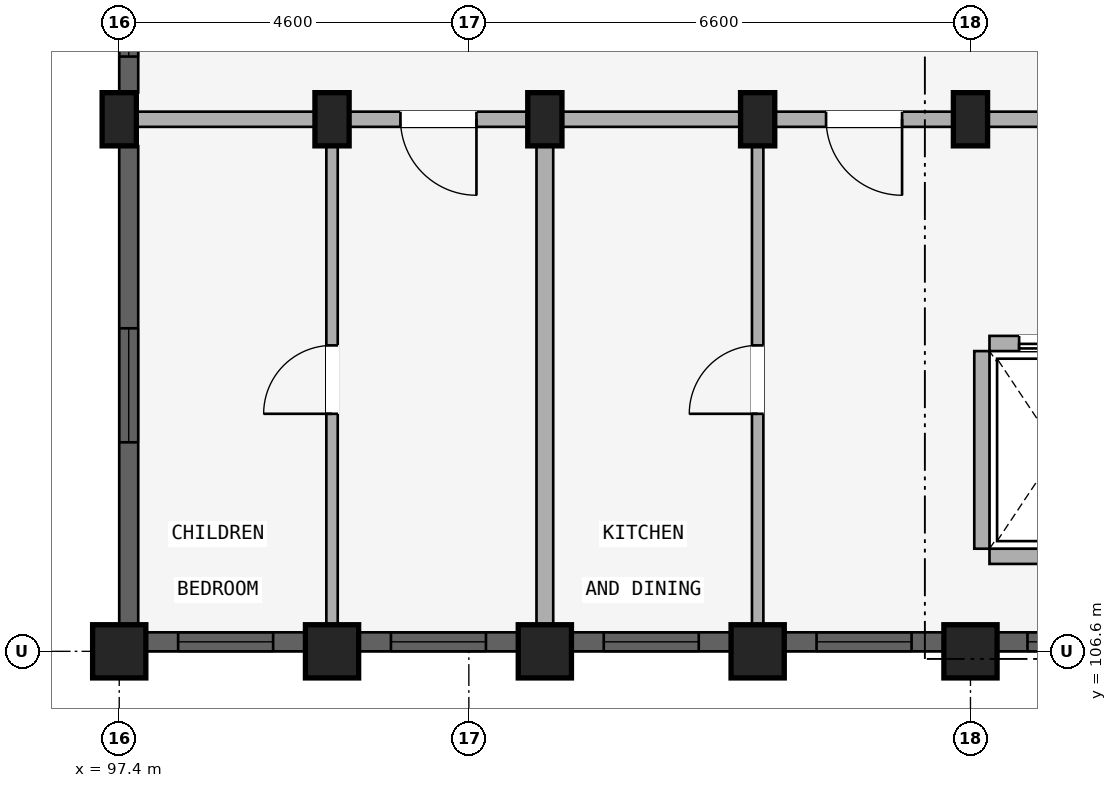
"""IFC4 building model, lengths in metres.
Left out: names, types, materials, properties, quantities, classifications, styles, units other than length and angle.
Written with IfcOpenShell. Run it as: python <this file> out.ifc"""

import sys

from ifc_helpers import new_model, si_unit, direction, frame, frame_2d, origin, origin_2d, place, context, subcontext, project, spatial, rectangle, extrude, element, fill, save


model = new_model("IFC4")
c1 = context("Model", 3, precision=1e-05, world=origin(), true_north=direction((0.0, 1.0)))
c2 = subcontext(c1, "Body", "Model", "MODEL_VIEW")
j1 = project(units=[si_unit("LENGTHUNIT", "METRE"), si_unit("PLANEANGLEUNIT", "RADIAN")], contexts=[c1])
p1 = place(None, origin())
s1 = spatial("IfcSite", under=j1, at=p1, CompositionType="ELEMENT")
p2 = place(p1, origin())
s2 = spatial("IfcBuilding", under=s1, at=p2, CompositionType="ELEMENT")
p3 = place(p2, frame((0.0, 0.0, 24.45)))
s3 = spatial("IfcBuildingStorey", under=s2, at=p3, CompositionType="ELEMENT", Elevation=24.45)
p4 = place(p3, frame((108.6, 106.6, 0.0), z_axis=(0.0, 0.0, 1.0), x_axis=(1.0, 0.0, 0.0)))
e1 = element("IfcColumn", 1, at=p4, inside=s3, PredefinedType="COLUMN", context=c2, shape_type="SweptSolid", body=[
    extrude(rectangle(XDim=0.7, YDim=0.7, at=origin_2d()), origin(), (0.0, 0.0, 1.0), 2.93),
])
p5 = place(p3, frame((108.6, 113.6, 0.0), z_axis=(0.0, 0.0, 1.0), x_axis=(1.0, 0.0, 0.0)))
e2 = element("IfcColumn", 2, at=p5, inside=s3, PredefinedType="COLUMN", context=c2, shape_type="SweptSolid", body=[
    extrude(rectangle(XDim=0.45, YDim=0.7, at=origin_2d()), origin(), (0.0, 0.0, 1.0), 2.93),
])
p6 = place(p3, frame((105.8, 106.6, 0.0), z_axis=(0.0, 0.0, 1.0), x_axis=(1.0, 0.0, 0.0)))
e3 = element("IfcColumn", 3, at=p6, inside=s3, PredefinedType="COLUMN", context=c2, shape_type="SweptSolid", body=[
    extrude(rectangle(XDim=0.7, YDim=0.7, at=origin_2d()), origin(), (0.0, 0.0, 1.0), 2.93),
])
p7 = place(p3, frame((105.8, 113.6, 0.0), z_axis=(0.0, 0.0, 1.0), x_axis=(1.0, 0.0, 0.0)))
e4 = element("IfcColumn", 4, at=p7, inside=s3, PredefinedType="COLUMN", context=c2, shape_type="SweptSolid", body=[
    extrude(rectangle(XDim=0.45, YDim=0.7, at=origin_2d()), origin(), (0.0, 0.0, 1.0), 2.93),
])
p8 = place(p3, frame((103.0, 106.6, 0.0), z_axis=(0.0, 0.0, 1.0), x_axis=(1.0, 0.0, 0.0)))
e5 = element("IfcColumn", 5, at=p8, inside=s3, PredefinedType="COLUMN", context=c2, shape_type="SweptSolid", body=[
    extrude(rectangle(XDim=0.7, YDim=0.7, at=origin_2d()), origin(), (0.0, 0.0, 1.0), 2.93),
])
p9 = place(p3, frame((103.0, 113.6, 0.0), z_axis=(0.0, 0.0, 1.0), x_axis=(1.0, 0.0, 0.0)))
e6 = element("IfcColumn", 6, at=p9, inside=s3, PredefinedType="COLUMN", context=c2, shape_type="SweptSolid", body=[
    extrude(rectangle(XDim=0.45, YDim=0.7, at=origin_2d()), origin(), (0.0, 0.0, 1.0), 2.93),
])
p10 = place(p3, frame((100.2, 106.6, 0.0), z_axis=(0.0, 0.0, 1.0), x_axis=(1.0, 0.0, 0.0)))
e7 = element("IfcColumn", 7, at=p10, inside=s3, PredefinedType="COLUMN", context=c2, shape_type="SweptSolid", body=[
    extrude(rectangle(XDim=0.7, YDim=0.7, at=origin_2d()), origin(), (0.0, 0.0, 1.0), 2.93),
])
p11 = place(p3, frame((100.2, 113.6, 0.0), z_axis=(0.0, 0.0, 1.0), x_axis=(1.0, 0.0, 0.0)))
e8 = element("IfcColumn", 8, at=p11, inside=s3, PredefinedType="COLUMN", context=c2, shape_type="SweptSolid", body=[
    extrude(rectangle(XDim=0.45, YDim=0.7, at=origin_2d()), origin(), (0.0, 0.0, 1.0), 2.93),
])
p12 = place(p3, frame((97.4, 106.6, 0.0), z_axis=(0.0, 0.0, 1.0), x_axis=(1.0, 0.0, 0.0)))
e9 = element("IfcColumn", 9, at=p12, inside=s3, PredefinedType="COLUMN", context=c2, shape_type="SweptSolid", body=[
    extrude(rectangle(XDim=0.7, YDim=0.7, at=origin_2d()), origin(), (0.0, 0.0, 1.0), 2.93),
])
p13 = place(p3, frame((97.4, 113.6, 0.0), z_axis=(0.0, 0.0, 1.0), x_axis=(1.0, 0.0, 0.0)))
e10 = element("IfcColumn", 10, at=p13, inside=s3, PredefinedType="COLUMN", context=c2, shape_type="SweptSolid", body=[
    extrude(rectangle(XDim=0.45, YDim=0.7, at=origin_2d()), origin(), (0.0, 0.0, 1.0), 2.93),
])
p14 = place(p3, frame((108.75, 107.95, 0.0), z_axis=(0.0, 0.0, 1.0), x_axis=(0.0, 1.0, 0.0)))
e11 = element("IfcWall", 11, at=p14, inside=s3, PredefinedType="STANDARD", context=c2, shape_type="SweptSolid", body=[
    extrude(rectangle(XDim=2.6, YDim=0.2, at=frame_2d((1.3, 0.0))), origin(), (0.0, 0.0, 1.0), 2.372),
])
p15 = place(p3, frame((110.65, 107.85, 0.0), z_axis=(0.0, 0.0, 1.0), x_axis=(-1.0, 0.0, 0.0)))
e12 = element("IfcWall", 12, at=p15, inside=s3, PredefinedType="STANDARD", context=c2, shape_type="SweptSolid", body=[
    extrude(rectangle(XDim=1.8, YDim=0.2, at=frame_2d((0.9, 0.0))), origin(), (0.0, 0.0, 1.0), 2.93),
])
p16 = place(p3, frame((110.65, 110.65, 0.0), z_axis=(0.0, 0.0, 1.0), x_axis=(-1.0, 0.0, 0.0)))
e13 = element("IfcWall", 13, at=p16, inside=s3, PredefinedType="STANDARD", context=c2, shape_type="SweptSolid", body=[
    extrude(rectangle(XDim=1.8, YDim=0.2, at=frame_2d((0.9, 0.0))), origin(), (0.0, 0.0, 1.0), 2.93),
])
p17 = place(p16, frame((0.39, 0.0, 0.0)))
e14 = element("IfcOpeningElement", 14, at=p17, cuts=e13, PredefinedType="OPENING", context=c2, shape_type="SweptSolid", body=[
    extrude(rectangle(XDim=1.02, YDim=2.15, at=frame_2d((0.51, 1.075))), frame((0.0, 0.11, 0.0), z_axis=(0.0, -1.0, 0.0), x_axis=(1.0, 0.0, 0.0)), (0.0, 0.0, 1.0), 0.22),
])
p18 = place(p3, frame((114.25, 113.6, 0.0), z_axis=(0.0, 0.0, 1.0), x_axis=(-1.0, 0.0, 0.0)))
e15 = element("IfcWall", 15, at=p18, inside=s3, PredefinedType="STANDARD", context=c2, shape_type="SweptSolid", body=[
    extrude(rectangle(XDim=5.6, YDim=0.2, at=frame_2d((2.8, 0.0))), origin(), (0.0, 0.0, 1.0), 2.372),
])
p19 = place(p18, frame((1.91, 0.0, 0.0)))
e16 = element("IfcOpeningElement", 16, at=p19, cuts=e15, PredefinedType="OPENING", context=c2, shape_type="SweptSolid", body=[
    extrude(rectangle(XDim=1.22, YDim=2.15, at=frame_2d((0.61, 1.075))), frame((0.0, 0.11, 0.0), z_axis=(0.0, -1.0, 0.0), x_axis=(1.0, 0.0, 0.0)), (0.0, 0.0, 1.0), 0.22),
])
p20 = place(p3, frame((108.6, 113.6, 0.0), z_axis=(0.0, 0.0, 1.0), x_axis=(-1.0, 0.0, 0.0)))
e17 = element("IfcWall", 17, at=p20, inside=s3, PredefinedType="STANDARD", context=c2, shape_type="SweptSolid", body=[
    extrude(rectangle(XDim=2.8, YDim=0.2, at=frame_2d((1.4, 0.0))), origin(), (0.0, 0.0, 1.0), 2.372),
])
p21 = place(p20, frame((0.9, 0.0, 0.0)))
e18 = element("IfcOpeningElement", 18, at=p21, cuts=e17, PredefinedType="OPENING", context=c2, shape_type="SweptSolid", body=[
    extrude(rectangle(XDim=1.0, YDim=2.15, at=frame_2d((0.5, 1.075))), frame((0.0, 0.11, 0.0), z_axis=(0.0, -1.0, 0.0), x_axis=(1.0, 0.0, 0.0)), (0.0, 0.0, 1.0), 0.22),
])
p22 = place(p3, frame((105.8, 113.6, 0.0), z_axis=(0.0, 0.0, 1.0), x_axis=(-1.0, 0.0, 0.0)))
e19 = element("IfcWall", 19, at=p22, inside=s3, PredefinedType="STANDARD", context=c2, shape_type="SweptSolid", body=[
    extrude(rectangle(XDim=2.8, YDim=0.2, at=frame_2d((1.4, 0.0))), origin(), (0.0, 0.0, 1.0), 2.372),
])
p23 = place(p3, frame((103.0, 113.6, 0.0), z_axis=(0.0, 0.0, 1.0), x_axis=(-1.0, 0.0, 0.0)))
e20 = element("IfcWall", 20, at=p23, inside=s3, PredefinedType="STANDARD", context=c2, shape_type="SweptSolid", body=[
    extrude(rectangle(XDim=2.8, YDim=0.2, at=frame_2d((1.4, 0.0))), origin(), (0.0, 0.0, 1.0), 2.372),
])
p24 = place(p23, frame((0.9, 0.0, 0.0)))
e21 = element("IfcOpeningElement", 21, at=p24, cuts=e20, PredefinedType="OPENING", context=c2, shape_type="SweptSolid", body=[
    extrude(rectangle(XDim=1.0, YDim=2.15, at=frame_2d((0.5, 1.075))), frame((0.0, 0.11, 0.0), z_axis=(0.0, -1.0, 0.0), x_axis=(1.0, 0.0, 0.0)), (0.0, 0.0, 1.0), 0.22),
])
p25 = place(p3, frame((100.2, 113.6, 0.0), z_axis=(0.0, 0.0, 1.0), x_axis=(-1.0, 0.0, 0.0)))
e22 = element("IfcWall", 22, at=p25, inside=s3, PredefinedType="STANDARD", context=c2, shape_type="SweptSolid", body=[
    extrude(rectangle(XDim=2.8, YDim=0.2, at=frame_2d((1.4, 0.0))), origin(), (0.0, 0.0, 1.0), 2.372),
])
p26 = place(p3, frame((105.8, 106.8, 0.0), z_axis=(0.0, 0.0, 1.0), x_axis=(0.0, 1.0, 0.0)))
e23 = element("IfcWall", 23, at=p26, inside=s3, PredefinedType="PARTITIONING", context=c2, shape_type="SweptSolid", body=[
    extrude(rectangle(XDim=6.75, YDim=0.15, at=frame_2d((3.375, 0.0))), origin(), (0.0, 0.0, 1.0), 2.372),
])
p27 = place(p26, frame((2.925, 0.0, 0.0)))
e24 = element("IfcOpeningElement", 24, at=p27, cuts=e23, PredefinedType="OPENING", context=c2, shape_type="SweptSolid", body=[
    extrude(rectangle(XDim=0.9, YDim=2.1, at=frame_2d((0.45, 1.05))), frame((0.0, 0.085, 0.0), z_axis=(0.0, -1.0, 0.0), x_axis=(1.0, 0.0, 0.0)), (0.0, 0.0, 1.0), 0.17),
])
p28 = place(p3, frame((103.0, 106.8, 0.0), z_axis=(0.0, 0.0, 1.0), x_axis=(0.0, 1.0, 0.0)))
e25 = element("IfcWall", 25, at=p28, inside=s3, PredefinedType="STANDARD", context=c2, shape_type="SweptSolid", body=[
    extrude(rectangle(XDim=6.75, YDim=0.22, at=frame_2d((3.375, 0.0))), origin(), (0.0, 0.0, 1.0), 2.372),
])
p29 = place(p3, frame((100.2, 106.8, 0.0), z_axis=(0.0, 0.0, 1.0), x_axis=(0.0, 1.0, 0.0)))
e26 = element("IfcWall", 26, at=p29, inside=s3, PredefinedType="PARTITIONING", context=c2, shape_type="SweptSolid", body=[
    extrude(rectangle(XDim=6.75, YDim=0.15, at=frame_2d((3.375, 0.0))), origin(), (0.0, 0.0, 1.0), 2.372),
])
p30 = place(p29, frame((2.925, 0.0, 0.0)))
e27 = element("IfcOpeningElement", 27, at=p30, cuts=e26, PredefinedType="OPENING", context=c2, shape_type="SweptSolid", body=[
    extrude(rectangle(XDim=0.9, YDim=2.1, at=frame_2d((0.45, 1.05))), frame((0.0, 0.085, 0.0), z_axis=(0.0, -1.0, 0.0), x_axis=(1.0, 0.0, 0.0)), (0.0, 0.0, 1.0), 0.17),
])
p31 = place(p3, frame((111.372, 106.725, 0.0), z_axis=(0.0, 0.0, 1.0), x_axis=(-1.0, 0.0, 0.0)))
e28 = element("IfcWall", 28, at=p31, inside=s3, PredefinedType="STANDARD", context=c2, shape_type="SweptSolid", body=[
    extrude(rectangle(XDim=2.422, YDim=0.25, at=frame_2d((1.211, 0.0))), origin(), (0.0, 0.0, 1.0), 2.472),
])
p32 = place(p31, frame((0.822, 0.0, 0.772)))
e29 = element("IfcOpeningElement", 29, at=p32, cuts=e28, PredefinedType="OPENING", context=c2, shape_type="SweptSolid", body=[
    extrude(rectangle(XDim=1.2, YDim=1.5, at=frame_2d((0.6, 0.75))), frame((0.0, 0.135, 0.0), z_axis=(0.0, -1.0, 0.0), x_axis=(1.0, 0.0, 0.0)), (0.0, 0.0, 1.0), 0.27),
])
p33 = place(p3, frame((108.247, 106.725, 0.0), z_axis=(0.0, 0.0, 1.0), x_axis=(-1.0, 0.0, 0.0)))
e30 = element("IfcWall", 30, at=p33, inside=s3, PredefinedType="STANDARD", context=c2, shape_type="SweptSolid", body=[
    extrude(rectangle(XDim=2.093, YDim=0.25, at=frame_2d((1.046, 0.0))), origin(), (0.0, 0.0, 1.0), 2.472),
])
p34 = place(p33, frame((0.421, 0.0, 0.722)))
e31 = element("IfcOpeningElement", 31, at=p34, cuts=e30, PredefinedType="OPENING", context=c2, shape_type="SweptSolid", body=[
    extrude(rectangle(XDim=1.25, YDim=1.55, at=frame_2d((0.625, 0.775))), frame((0.0, 0.135, 0.0), z_axis=(0.0, -1.0, 0.0), x_axis=(1.0, 0.0, 0.0)), (0.0, 0.0, 1.0), 0.27),
])
p35 = place(p3, frame((105.447, 106.725, 0.0), z_axis=(0.0, 0.0, 1.0), x_axis=(-1.0, 0.0, 0.0)))
e32 = element("IfcWall", 32, at=p35, inside=s3, PredefinedType="STANDARD", context=c2, shape_type="SweptSolid", body=[
    extrude(rectangle(XDim=2.093, YDim=0.25, at=frame_2d((1.046, 0.0))), origin(), (0.0, 0.0, 1.0), 2.472),
])
p36 = place(p35, frame((0.421, 0.0, 0.722)))
e33 = element("IfcOpeningElement", 33, at=p36, cuts=e32, PredefinedType="OPENING", context=c2, shape_type="SweptSolid", body=[
    extrude(rectangle(XDim=1.25, YDim=1.55, at=frame_2d((0.625, 0.775))), frame((0.0, 0.135, 0.0), z_axis=(0.0, -1.0, 0.0), x_axis=(1.0, 0.0, 0.0)), (0.0, 0.0, 1.0), 0.27),
])
p37 = place(p3, frame((102.646, 106.725, 0.0), z_axis=(0.0, 0.0, 1.0), x_axis=(-1.0, 0.0, 0.0)))
e34 = element("IfcWall", 34, at=p37, inside=s3, PredefinedType="STANDARD", context=c2, shape_type="SweptSolid", body=[
    extrude(rectangle(XDim=2.093, YDim=0.25, at=frame_2d((1.046, 0.0))), origin(), (0.0, 0.0, 1.0), 2.472),
])
p38 = place(p37, frame((0.421, 0.0, 0.722)))
e35 = element("IfcOpeningElement", 35, at=p38, cuts=e34, PredefinedType="OPENING", context=c2, shape_type="SweptSolid", body=[
    extrude(rectangle(XDim=1.25, YDim=1.55, at=frame_2d((0.625, 0.775))), frame((0.0, 0.135, 0.0), z_axis=(0.0, -1.0, 0.0), x_axis=(1.0, 0.0, 0.0)), (0.0, 0.0, 1.0), 0.27),
])
p39 = place(p3, frame((99.846, 106.725, 0.0), z_axis=(0.0, 0.0, 1.0), x_axis=(-1.0, 0.0, 0.0)))
e36 = element("IfcWall", 36, at=p39, inside=s3, PredefinedType="STANDARD", context=c2, shape_type="SweptSolid", body=[
    extrude(rectangle(XDim=2.093, YDim=0.25, at=frame_2d((1.046, 0.0))), origin(), (0.0, 0.0, 1.0), 2.472),
])
p40 = place(p39, frame((0.421, 0.0, 0.722)))
e37 = element("IfcOpeningElement", 37, at=p40, cuts=e36, PredefinedType="OPENING", context=c2, shape_type="SweptSolid", body=[
    extrude(rectangle(XDim=1.25, YDim=1.55, at=frame_2d((0.625, 0.775))), frame((0.0, 0.135, 0.0), z_axis=(0.0, -1.0, 0.0), x_axis=(1.0, 0.0, 0.0)), (0.0, 0.0, 1.0), 0.27),
])
p41 = place(p3, frame((97.525, 106.954, 0.0), z_axis=(0.0, 0.0, 1.0), x_axis=(0.0, 1.0, 0.0)))
e38 = element("IfcWall", 38, at=p41, inside=s3, PredefinedType="STANDARD", context=c2, shape_type="SweptSolid", body=[
    extrude(rectangle(XDim=6.293, YDim=0.25, at=frame_2d((3.146, 0.0))), origin(), (0.0, 0.0, 1.0), 2.372),
])
p42 = place(p41, frame((2.396, 0.0, 0.522)))
e39 = element("IfcOpeningElement", 39, at=p42, cuts=e38, PredefinedType="OPENING", context=c2, shape_type="SweptSolid", body=[
    extrude(rectangle(XDim=1.5, YDim=1.65, at=frame_2d((0.75, 0.825))), frame((0.0, 0.135, 0.0), z_axis=(0.0, -1.0, 0.0), x_axis=(1.0, 0.0, 0.0)), (0.0, 0.0, 1.0), 0.27),
])
p43 = place(p3, frame((97.525, 113.954, 0.0), z_axis=(0.0, 0.0, 1.0), x_axis=(0.0, 1.0, 0.0)))
e40 = element("IfcWall", 40, at=p43, inside=s3, PredefinedType="STANDARD", context=c2, shape_type="SweptSolid", body=[
    extrude(rectangle(XDim=1.693, YDim=0.25, at=frame_2d((0.846, 0.0))), origin(), (0.0, 0.0, 1.0), 2.372),
])
p44 = place(p43, frame((0.471, 0.0, 0.88)))
e41 = element("IfcOpeningElement", 41, at=p44, cuts=e40, PredefinedType="OPENING", context=c2, shape_type="SweptSolid", body=[
    extrude(rectangle(XDim=0.75, YDim=1.05, at=frame_2d((0.375, 0.525))), frame((0.0, 0.135, 0.0), z_axis=(0.0, -1.0, 0.0), x_axis=(1.0, 0.0, 0.0)), (0.0, 0.0, 1.0), 0.27),
])
p45 = place(p32, origin())
e42 = element("IfcWindow", 42, at=p45, inside=s3, PartitioningType="SINGLE_PANEL", PredefinedType="WINDOW", context=c2, shape_type="SweptSolid", body=[
    extrude(rectangle(XDim=1.2, YDim=1.5, at=frame_2d((0.6, 0.75))), frame((0.0, 0.03, 0.0), z_axis=(0.0, -1.0, 0.0), x_axis=(1.0, 0.0, 0.0)), (0.0, 0.0, 1.0), 0.06),
])
fill(e29, e42)
p46 = place(p34, origin())
e43 = element("IfcWindow", 43, at=p46, inside=s3, PartitioningType="SINGLE_PANEL", PredefinedType="WINDOW", context=c2, shape_type="SweptSolid", body=[
    extrude(rectangle(XDim=1.25, YDim=1.55, at=frame_2d((0.625, 0.775))), frame((0.0, 0.03, 0.0), z_axis=(0.0, -1.0, 0.0), x_axis=(1.0, 0.0, 0.0)), (0.0, 0.0, 1.0), 0.06),
])
fill(e31, e43)
p47 = place(p36, origin())
e44 = element("IfcWindow", 44, at=p47, inside=s3, PartitioningType="SINGLE_PANEL", PredefinedType="WINDOW", context=c2, shape_type="SweptSolid", body=[
    extrude(rectangle(XDim=1.25, YDim=1.55, at=frame_2d((0.625, 0.775))), frame((0.0, 0.03, 0.0), z_axis=(0.0, -1.0, 0.0), x_axis=(1.0, 0.0, 0.0)), (0.0, 0.0, 1.0), 0.06),
])
fill(e33, e44)
p48 = place(p38, origin())
e45 = element("IfcWindow", 45, at=p48, inside=s3, PartitioningType="SINGLE_PANEL", PredefinedType="WINDOW", context=c2, shape_type="SweptSolid", body=[
    extrude(rectangle(XDim=1.25, YDim=1.55, at=frame_2d((0.625, 0.775))), frame((0.0, 0.03, 0.0), z_axis=(0.0, -1.0, 0.0), x_axis=(1.0, 0.0, 0.0)), (0.0, 0.0, 1.0), 0.06),
])
fill(e35, e45)
p49 = place(p40, origin())
e46 = element("IfcWindow", 46, at=p49, inside=s3, PartitioningType="SINGLE_PANEL", PredefinedType="WINDOW", context=c2, shape_type="SweptSolid", body=[
    extrude(rectangle(XDim=1.25, YDim=1.55, at=frame_2d((0.625, 0.775))), frame((0.0, 0.03, 0.0), z_axis=(0.0, -1.0, 0.0), x_axis=(1.0, 0.0, 0.0)), (0.0, 0.0, 1.0), 0.06),
])
fill(e37, e46)
p50 = place(p42, origin())
e47 = element("IfcWindow", 47, at=p50, inside=s3, PartitioningType="DOUBLE_PANEL_VERTICAL", PredefinedType="WINDOW", context=c2, shape_type="SweptSolid", body=[
    extrude(rectangle(XDim=1.5, YDim=1.65, at=frame_2d((0.75, 0.825))), frame((0.0, 0.03, 0.0), z_axis=(0.0, -1.0, 0.0), x_axis=(1.0, 0.0, 0.0)), (0.0, 0.0, 1.0), 0.06),
])
fill(e39, e47)
p51 = place(p44, origin())
e48 = element("IfcWindow", 48, at=p51, inside=s3, PartitioningType="SINGLE_PANEL", PredefinedType="WINDOW", context=c2, shape_type="SweptSolid", body=[
    extrude(rectangle(XDim=0.75, YDim=1.05, at=frame_2d((0.375, 0.525))), frame((0.0, 0.03, 0.0), z_axis=(0.0, -1.0, 0.0), x_axis=(1.0, 0.0, 0.0)), (0.0, 0.0, 1.0), 0.06),
])
fill(e41, e48)
p52 = place(p17, origin())
e49 = element("IfcDoor", 49, at=p52, inside=s3, OperationType="SLIDING_TO_RIGHT", PredefinedType="DOOR", context=c2, shape_type="SweptSolid", body=[
    extrude(rectangle(XDim=1.02, YDim=2.15, at=frame_2d((0.51, 1.075))), frame((0.0, 0.025, 0.0), z_axis=(0.0, -1.0, 0.0), x_axis=(1.0, 0.0, 0.0)), (0.0, 0.0, 1.0), 0.05),
])
fill(e14, e49)
p53 = place(p21, frame((1.0, 0.0, 0.0), z_axis=(0.0, 0.0, 1.0), x_axis=(-1.0, 0.0, 0.0)))
e50 = element("IfcDoor", 50, at=p53, inside=s3, OperationType="SINGLE_SWING_RIGHT", PredefinedType="DOOR", context=c2, shape_type="SweptSolid", body=[
    extrude(rectangle(XDim=1.0, YDim=2.15, at=frame_2d((0.5, 1.075))), frame((0.0, 0.025, 0.0), z_axis=(0.0, -1.0, 0.0), x_axis=(1.0, 0.0, 0.0)), (0.0, 0.0, 1.0), 0.05),
])
fill(e18, e50)
p54 = place(p24, frame((1.0, 0.0, 0.0), z_axis=(0.0, 0.0, 1.0), x_axis=(-1.0, 0.0, 0.0)))
e51 = element("IfcDoor", 51, at=p54, inside=s3, OperationType="SINGLE_SWING_RIGHT", PredefinedType="DOOR", context=c2, shape_type="SweptSolid", body=[
    extrude(rectangle(XDim=1.0, YDim=2.15, at=frame_2d((0.5, 1.075))), frame((0.0, 0.025, 0.0), z_axis=(0.0, -1.0, 0.0), x_axis=(1.0, 0.0, 0.0)), (0.0, 0.0, 1.0), 0.05),
])
fill(e21, e51)
p55 = place(p27, origin())
e52 = element("IfcDoor", 52, at=p55, inside=s3, OperationType="SINGLE_SWING_LEFT", PredefinedType="DOOR", context=c2, shape_type="SweptSolid", body=[
    extrude(rectangle(XDim=0.9, YDim=2.1, at=frame_2d((0.45, 1.05))), frame((0.0, 0.025, 0.0), z_axis=(0.0, -1.0, 0.0), x_axis=(1.0, 0.0, 0.0)), (0.0, 0.0, 1.0), 0.05),
])
fill(e24, e52)
p56 = place(p30, frame((0.9, 0.0, 0.0), z_axis=(0.0, 0.0, 1.0), x_axis=(-1.0, 0.0, 0.0)))
e53 = element("IfcDoor", 53, at=p56, inside=s3, OperationType="SINGLE_SWING_RIGHT", PredefinedType="DOOR", context=c2, shape_type="SweptSolid", body=[
    extrude(rectangle(XDim=0.9, YDim=2.1, at=frame_2d((0.45, 1.05))), frame((0.0, 0.025, 0.0), z_axis=(0.0, -1.0, 0.0), x_axis=(1.0, 0.0, 0.0)), (0.0, 0.0, 1.0), 0.05),
])
fill(e27, e53)
save(model, sys.argv[1])
